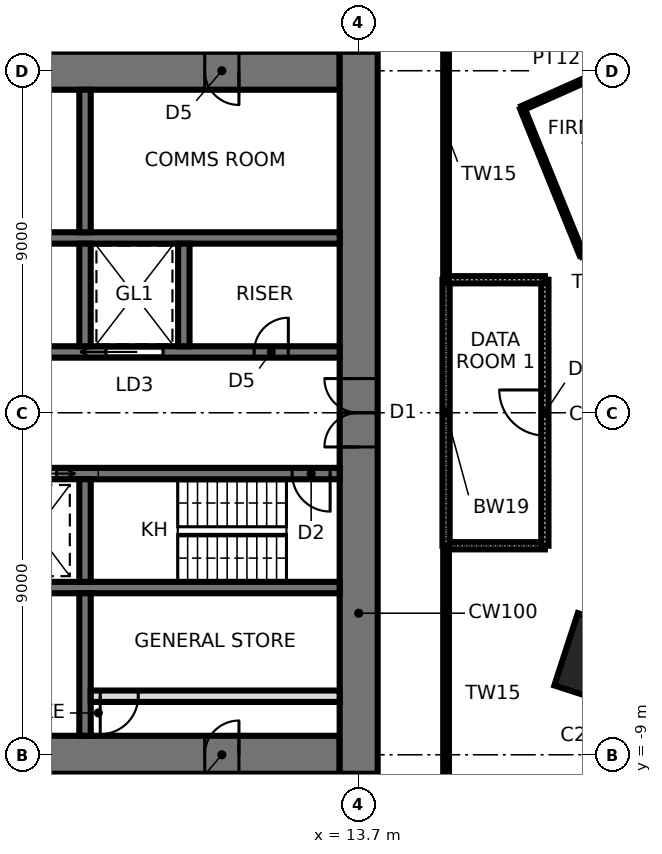
"""IFC4 building model, lengths in metres.
Left out: names, types, materials, properties, quantities, classifications, styles, units other than length and angle.
Written with IfcOpenShell. Run it as: python <this file> out.ifc"""

import sys

from ifc_helpers import new_model, si_unit, direction, frame, frame_2d, origin, origin_2d, place, context, subcontext, project, spatial, rectangle, extrude, element, fill, save


model = new_model("IFC4")
c1 = context("Model", 3, precision=1e-05, world=origin(), true_north=direction((0.0, 1.0)))
c2 = subcontext(c1, "Body", "Model", "MODEL_VIEW")
j1 = project(units=[si_unit("LENGTHUNIT", "METRE"), si_unit("PLANEANGLEUNIT", "RADIAN")], contexts=[c1])
p1 = place(None, origin())
s1 = spatial("IfcSite", under=j1, at=p1, CompositionType="ELEMENT")
p2 = place(p1, origin())
s2 = spatial("IfcBuilding", under=s1, at=p2, CompositionType="ELEMENT")
p3 = place(p2, frame((0.0, 0.0, 65.8)))
s3 = spatial("IfcBuildingStorey", under=s2, at=p3, CompositionType="ELEMENT", Elevation=65.8)
for number, where, z_axis, x_axis in (
    (1, (20.808, 6.761, 0.0), (0.0, 0.0, 1.0), (0.951, 0.309, 0.0)),
    (2, (20.109, -6.534, 0.0), (0.0, 0.0, 1.0), (0.951, -0.309, 0.0)),
):
    element("IfcColumn", number, at=place(p3, frame(where, z_axis=z_axis, x_axis=x_axis)), inside=s3, PredefinedType="COLUMN", context=c2, shape_type="SweptSolid", body=[
        extrude(rectangle(XDim=2.0, YDim=2.0, at=origin_2d()), origin(), (0.0, 0.0, 1.0), 4.2),
    ])
p4 = place(p3, frame((-13.2, -9.0, 0.0), z_axis=(0.0, 0.0, 1.0), x_axis=(1.0, 0.0, 0.0)))
e3 = element("IfcWall", 3, at=p4, inside=s3, PredefinedType="SHEAR", context=c2, shape_type="SweptSolid", body=[
    extrude(rectangle(XDim=26.4, YDim=1.0, at=frame_2d((13.2, 0.0))), origin(), (0.0, 0.0, 1.0), 4.2),
])
p5 = place(p4, frame((2.65, 0.0, 0.0)))
e4 = element("IfcOpeningElement", 4, at=p5, cuts=e3, PredefinedType="OPENING", context=c2, shape_type="SweptSolid", body=[
    extrude(rectangle(XDim=0.9, YDim=2.1, at=frame_2d((0.45, 1.05))), frame((0.0, 0.51, 0.0), z_axis=(0.0, -1.0, 0.0), x_axis=(1.0, 0.0, 0.0)), (0.0, 0.0, 1.0), 1.02),
])
p6 = place(p4, frame((9.5, 0.0, 0.0)))
e5 = element("IfcOpeningElement", 5, at=p6, cuts=e3, PredefinedType="OPENING", context=c2, shape_type="SweptSolid", body=[
    extrude(rectangle(XDim=0.9, YDim=2.1, at=frame_2d((0.45, 1.05))), frame((0.0, 0.51, 0.0), z_axis=(0.0, -1.0, 0.0), x_axis=(1.0, 0.0, 0.0)), (0.0, 0.0, 1.0), 1.02),
])
p7 = place(p4, frame((16.0, 0.0, 0.0)))
e6 = element("IfcOpeningElement", 6, at=p7, cuts=e3, PredefinedType="OPENING", context=c2, shape_type="SweptSolid", body=[
    extrude(rectangle(XDim=0.9, YDim=2.1, at=frame_2d((0.45, 1.05))), frame((0.0, 0.51, 0.0), z_axis=(0.0, -1.0, 0.0), x_axis=(1.0, 0.0, 0.0)), (0.0, 0.0, 1.0), 1.02),
])
p8 = place(p4, frame((22.85, 0.0, 0.0)))
e7 = element("IfcOpeningElement", 7, at=p8, cuts=e3, PredefinedType="OPENING", context=c2, shape_type="SweptSolid", body=[
    extrude(rectangle(XDim=0.9, YDim=2.1, at=frame_2d((0.45, 1.05))), frame((0.0, 0.51, 0.0), z_axis=(0.0, -1.0, 0.0), x_axis=(1.0, 0.0, 0.0)), (0.0, 0.0, 1.0), 1.02),
])
p9 = place(p3, frame((13.2, 9.0, 0.0), z_axis=(0.0, 0.0, 1.0), x_axis=(-1.0, 0.0, 0.0)))
e8 = element("IfcWall", 8, at=p9, inside=s3, PredefinedType="SHEAR", context=c2, shape_type="SweptSolid", body=[
    extrude(rectangle(XDim=26.4, YDim=1.0, at=frame_2d((13.2, 0.0))), origin(), (0.0, 0.0, 1.0), 4.2),
])
p10 = place(p9, frame((2.65, 0.0, 0.0)))
e9 = element("IfcOpeningElement", 9, at=p10, cuts=e8, PredefinedType="OPENING", context=c2, shape_type="SweptSolid", body=[
    extrude(rectangle(XDim=0.9, YDim=2.1, at=frame_2d((0.45, 1.05))), frame((0.0, 0.51, 0.0), z_axis=(0.0, -1.0, 0.0), x_axis=(1.0, 0.0, 0.0)), (0.0, 0.0, 1.0), 1.02),
])
p11 = place(p9, frame((9.5, 0.0, 0.0)))
e10 = element("IfcOpeningElement", 10, at=p11, cuts=e8, PredefinedType="OPENING", context=c2, shape_type="SweptSolid", body=[
    extrude(rectangle(XDim=0.9, YDim=2.1, at=frame_2d((0.45, 1.05))), frame((0.0, 0.51, 0.0), z_axis=(0.0, -1.0, 0.0), x_axis=(1.0, 0.0, 0.0)), (0.0, 0.0, 1.0), 1.02),
])
p12 = place(p9, frame((16.0, 0.0, 0.0)))
e11 = element("IfcOpeningElement", 11, at=p12, cuts=e8, PredefinedType="OPENING", context=c2, shape_type="SweptSolid", body=[
    extrude(rectangle(XDim=0.9, YDim=2.1, at=frame_2d((0.45, 1.05))), frame((0.0, 0.51, 0.0), z_axis=(0.0, -1.0, 0.0), x_axis=(1.0, 0.0, 0.0)), (0.0, 0.0, 1.0), 1.02),
])
p13 = place(p9, frame((21.25, 0.0, 0.0)))
e12 = element("IfcOpeningElement", 12, at=p13, cuts=e8, PredefinedType="OPENING", context=c2, shape_type="SweptSolid", body=[
    extrude(rectangle(XDim=0.9, YDim=2.1, at=frame_2d((0.45, 1.05))), frame((0.0, 0.51, 0.0), z_axis=(0.0, -1.0, 0.0), x_axis=(1.0, 0.0, 0.0)), (0.0, 0.0, 1.0), 1.02),
])
p14 = place(p9, frame((24.8, 0.0, 0.0)))
e13 = element("IfcOpeningElement", 13, at=p14, cuts=e8, PredefinedType="OPENING", context=c2, shape_type="SweptSolid", body=[
    extrude(rectangle(XDim=1.0, YDim=2.1, at=frame_2d((0.5, 1.05))), frame((0.0, 0.51, 0.0), z_axis=(0.0, -1.0, 0.0), x_axis=(1.0, 0.0, 0.0)), (0.0, 0.0, 1.0), 1.02),
])
p15 = place(p3, frame((13.7, -9.5, 0.0), z_axis=(0.0, 0.0, 1.0), x_axis=(0.0, 1.0, 0.0)))
e14 = element("IfcWall", 14, at=p15, inside=s3, PredefinedType="SHEAR", context=c2, shape_type="SweptSolid", body=[
    extrude(rectangle(XDim=19.0, YDim=1.0, at=frame_2d((9.5, 0.0))), origin(), (0.0, 0.0, 1.0), 4.2),
])
p16 = place(p15, frame((8.6, 0.0, 0.0)))
e15 = element("IfcOpeningElement", 15, at=p16, cuts=e14, PredefinedType="OPENING", context=c2, shape_type="SweptSolid", body=[
    extrude(rectangle(XDim=1.8, YDim=2.4, at=frame_2d((0.9, 1.2))), frame((0.0, 0.51, 0.0), z_axis=(0.0, -1.0, 0.0), x_axis=(1.0, 0.0, 0.0)), (0.0, 0.0, 1.0), 1.02),
])
p17 = place(p3, frame((-13.2, 1.6, 0.0), z_axis=(0.0, 0.0, 1.0), x_axis=(1.0, 0.0, 0.0)))
e16 = element("IfcWall", 16, at=p17, inside=s3, PredefinedType="SHEAR", context=c2, shape_type="SweptSolid", body=[
    extrude(rectangle(XDim=26.4, YDim=0.3, at=frame_2d((13.2, 0.0))), origin(), (0.0, 0.0, 1.0), 4.2),
])
p18 = place(p17, frame((0.25, 0.0, 0.0)))
e17 = element("IfcOpeningElement", 17, at=p18, cuts=e16, PredefinedType="OPENING", context=c2, shape_type="SweptSolid", body=[
    extrude(rectangle(XDim=1.0, YDim=2.1, at=frame_2d((0.5, 1.05))), frame((0.0, 0.16, 0.0), z_axis=(0.0, -1.0, 0.0), x_axis=(1.0, 0.0, 0.0)), (0.0, 0.0, 1.0), 0.32),
])
p19 = place(p17, frame((20.25, 0.0, 0.0)))
e18 = element("IfcOpeningElement", 18, at=p19, cuts=e16, PredefinedType="OPENING", context=c2, shape_type="SweptSolid", body=[
    extrude(rectangle(XDim=1.5, YDim=2.4, at=frame_2d((0.75, 1.2))), frame((0.0, 0.16, 0.0), z_axis=(0.0, -1.0, 0.0), x_axis=(1.0, 0.0, 0.0)), (0.0, 0.0, 1.0), 0.32),
])
p20 = place(p17, frame((7.45, 0.0, 0.0)))
e19 = element("IfcOpeningElement", 19, at=p20, cuts=e16, PredefinedType="OPENING", context=c2, shape_type="SweptSolid", body=[
    extrude(rectangle(XDim=1.1, YDim=2.3, at=frame_2d((0.55, 1.15))), frame((0.0, 0.16, 0.0), z_axis=(0.0, -1.0, 0.0), x_axis=(1.0, 0.0, 0.0)), (0.0, 0.0, 1.0), 0.32),
])
p21 = place(p17, frame((10.05, 0.0, 0.0)))
e20 = element("IfcOpeningElement", 20, at=p21, cuts=e16, PredefinedType="OPENING", context=c2, shape_type="SweptSolid", body=[
    extrude(rectangle(XDim=1.1, YDim=2.3, at=frame_2d((0.55, 1.15))), frame((0.0, 0.16, 0.0), z_axis=(0.0, -1.0, 0.0), x_axis=(1.0, 0.0, 0.0)), (0.0, 0.0, 1.0), 0.32),
])
p22 = place(p17, frame((12.65, 0.0, 0.0)))
e21 = element("IfcOpeningElement", 21, at=p22, cuts=e16, PredefinedType="OPENING", context=c2, shape_type="SweptSolid", body=[
    extrude(rectangle(XDim=1.1, YDim=2.3, at=frame_2d((0.55, 1.15))), frame((0.0, 0.16, 0.0), z_axis=(0.0, -1.0, 0.0), x_axis=(1.0, 0.0, 0.0)), (0.0, 0.0, 1.0), 0.32),
])
p23 = place(p17, frame((24.15, 0.0, 0.0)))
e22 = element("IfcOpeningElement", 22, at=p23, cuts=e16, PredefinedType="OPENING", context=c2, shape_type="SweptSolid", body=[
    extrude(rectangle(XDim=0.9, YDim=2.1, at=frame_2d((0.45, 1.05))), frame((0.0, 0.16, 0.0), z_axis=(0.0, -1.0, 0.0), x_axis=(1.0, 0.0, 0.0)), (0.0, 0.0, 1.0), 0.32),
])
p24 = place(p3, frame((-13.2, -1.6, 0.0), z_axis=(0.0, 0.0, 1.0), x_axis=(1.0, 0.0, 0.0)))
e23 = element("IfcWall", 23, at=p24, inside=s3, PredefinedType="SHEAR", context=c2, shape_type="SweptSolid", body=[
    extrude(rectangle(XDim=26.4, YDim=0.3, at=frame_2d((13.2, 0.0))), origin(), (0.0, 0.0, 1.0), 4.2),
])
p25 = place(p24, frame((25.15, 0.0, 0.0)))
e24 = element("IfcOpeningElement", 24, at=p25, cuts=e23, PredefinedType="OPENING", context=c2, shape_type="SweptSolid", body=[
    extrude(rectangle(XDim=1.0, YDim=2.1, at=frame_2d((0.5, 1.05))), frame((0.0, 0.16, 0.0), z_axis=(0.0, -1.0, 0.0), x_axis=(1.0, 0.0, 0.0)), (0.0, 0.0, 1.0), 0.32),
])
p26 = place(p24, frame((15.25, 0.0, 0.0)))
e25 = element("IfcOpeningElement", 25, at=p26, cuts=e23, PredefinedType="OPENING", context=c2, shape_type="SweptSolid", body=[
    extrude(rectangle(XDim=1.1, YDim=2.3, at=frame_2d((0.55, 1.15))), frame((0.0, 0.16, 0.0), z_axis=(0.0, -1.0, 0.0), x_axis=(1.0, 0.0, 0.0)), (0.0, 0.0, 1.0), 0.32),
])
p27 = place(p24, frame((17.85, 0.0, 0.0)))
e26 = element("IfcOpeningElement", 26, at=p27, cuts=e23, PredefinedType="OPENING", context=c2, shape_type="SweptSolid", body=[
    extrude(rectangle(XDim=1.1, YDim=2.3, at=frame_2d((0.55, 1.15))), frame((0.0, 0.16, 0.0), z_axis=(0.0, -1.0, 0.0), x_axis=(1.0, 0.0, 0.0)), (0.0, 0.0, 1.0), 0.32),
])
p28 = place(p24, frame((5.55, 0.0, 0.0)))
e27 = element("IfcOpeningElement", 27, at=p28, cuts=e23, PredefinedType="OPENING", context=c2, shape_type="SweptSolid", body=[
    extrude(rectangle(XDim=0.9, YDim=2.1, at=frame_2d((0.45, 1.05))), frame((0.0, 0.16, 0.0), z_axis=(0.0, -1.0, 0.0), x_axis=(1.0, 0.0, 0.0)), (0.0, 0.0, 1.0), 0.32),
])
for number, where, z_axis, x_axis in (
    (28, (-13.2, 4.6, 0.0), (0.0, 0.0, 1.0), (1.0, 0.0, 0.0)),
    (29, (-13.2, -4.6, 0.0), (0.0, 0.0, 1.0), (1.0, 0.0, 0.0)),
):
    element("IfcWall", number, at=place(p3, frame(where, z_axis=z_axis, x_axis=x_axis)), inside=s3, PredefinedType="SHEAR", context=c2, shape_type="SweptSolid", body=[
        extrude(rectangle(XDim=26.4, YDim=0.3, at=frame_2d((13.2, 0.0))), origin(), (0.0, 0.0, 1.0), 4.2),
    ])
p29 = place(p3, frame((6.5, 1.75, 0.0), z_axis=(0.0, 0.0, 1.0), x_axis=(0.0, 1.0, 0.0)))
e30 = element("IfcWall", 30, at=p29, inside=s3, PredefinedType="SHEAR", context=c2, shape_type="SweptSolid", body=[
    extrude(rectangle(XDim=2.7, YDim=0.3, at=frame_2d((1.35, 0.0))), origin(), (0.0, 0.0, 1.0), 4.2),
])
p30 = place(p3, frame((6.5, 4.75, 0.0), z_axis=(0.0, 0.0, 1.0), x_axis=(0.0, 1.0, 0.0)))
e31 = element("IfcWall", 31, at=p30, inside=s3, PredefinedType="SHEAR", context=c2, shape_type="SweptSolid", body=[
    extrude(rectangle(XDim=3.75, YDim=0.3, at=frame_2d((1.875, 0.0))), origin(), (0.0, 0.0, 1.0), 4.2),
])
p31 = place(p3, frame((6.5, -1.75, 0.0), z_axis=(0.0, 0.0, 1.0), x_axis=(0.0, -1.0, 0.0)))
e32 = element("IfcWall", 32, at=p31, inside=s3, PredefinedType="SHEAR", context=c2, shape_type="SweptSolid", body=[
    extrude(rectangle(XDim=2.7, YDim=0.3, at=frame_2d((1.35, 0.0))), origin(), (0.0, 0.0, 1.0), 4.2),
])
p32 = place(p3, frame((6.5, -4.75, 0.0), z_axis=(0.0, 0.0, 1.0), x_axis=(0.0, -1.0, 0.0)))
e33 = element("IfcWall", 33, at=p32, inside=s3, PredefinedType="SHEAR", context=c2, shape_type="SweptSolid", body=[
    extrude(rectangle(XDim=3.75, YDim=0.3, at=frame_2d((1.875, 0.0))), origin(), (0.0, 0.0, 1.0), 4.2),
])
p33 = place(p3, frame((9.1, 1.75, 0.0), z_axis=(0.0, 0.0, 1.0), x_axis=(0.0, 1.0, 0.0)))
e34 = element("IfcWall", 34, at=p33, inside=s3, PredefinedType="SHEAR", context=c2, shape_type="SweptSolid", body=[
    extrude(rectangle(XDim=2.7, YDim=0.3, at=frame_2d((1.35, 0.0))), origin(), (0.0, 0.0, 1.0), 4.2),
])
p34 = place(p3, frame((6.65, -7.46, 0.0), z_axis=(0.0, 0.0, 1.0), x_axis=(1.0, 0.0, 0.0)))
e35 = element("IfcWall", 35, at=p34, inside=s3, PredefinedType="PARTITIONING", context=c2, shape_type="SweptSolid", body=[
    extrude(rectangle(XDim=6.55, YDim=0.3, at=frame_2d((3.275, 0.0))), origin(), (0.0, 0.0, 1.0), 4.04),
])
p35 = place(p34, frame((0.25, 0.0, 0.0)))
e36 = element("IfcOpeningElement", 36, at=p35, cuts=e35, PredefinedType="OPENING", context=c2, shape_type="SweptSolid", body=[
    extrude(rectangle(XDim=1.0, YDim=2.4, at=frame_2d((0.5, 1.2))), frame((0.0, 0.16, 0.0), z_axis=(0.0, -1.0, 0.0), x_axis=(1.0, 0.0, 0.0)), (0.0, 0.0, 1.0), 0.32),
])
p36 = place(p3, frame((16.0, -11.3, 0.0), z_axis=(0.0, 0.0, 1.0), x_axis=(0.0, 1.0, 0.0)))
e37 = element("IfcWall", 37, at=p36, inside=s3, PredefinedType="PARTITIONING", context=c2, shape_type="SweptSolid", body=[
    extrude(rectangle(XDim=7.8, YDim=0.15, at=frame_2d((3.9, 0.0))), origin(), (0.0, 0.0, 1.0), 4.04),
])
p37 = place(p3, frame((16.0, -3.5, 0.0), z_axis=(0.0, 0.0, 1.0), x_axis=(1.0, 0.0, 0.0)))
e38 = element("IfcWall", 38, at=p37, inside=s3, PredefinedType="SOLIDWALL", context=c2, shape_type="SweptSolid", body=[
    extrude(rectangle(XDim=2.6, YDim=0.19, at=frame_2d((1.3, 0.0))), origin(), (0.0, 0.0, 1.0), 4.04),
])
p38 = place(p3, frame((16.0, 3.5, 0.0), z_axis=(0.0, 0.0, 1.0), x_axis=(0.0, -1.0, 0.0)))
e39 = element("IfcWall", 39, at=p38, inside=s3, PredefinedType="SOLIDWALL", context=c2, shape_type="SweptSolid", body=[
    extrude(rectangle(XDim=7.0, YDim=0.19, at=frame_2d((3.5, 0.0))), origin(), (0.0, 0.0, 1.0), 4.04),
])
p39 = place(p3, frame((18.6, -3.5, 0.0), z_axis=(0.0, 0.0, 1.0), x_axis=(0.0, 1.0, 0.0)))
e40 = element("IfcWall", 40, at=p39, inside=s3, PredefinedType="SOLIDWALL", context=c2, shape_type="SweptSolid", body=[
    extrude(rectangle(XDim=7.0, YDim=0.19, at=frame_2d((3.5, 0.0))), origin(), (0.0, 0.0, 1.0), 3.586),
])
p40 = place(p39, frame((2.9, 0.0, 0.0)))
e41 = element("IfcOpeningElement", 41, at=p40, cuts=e40, PredefinedType="OPENING", context=c2, shape_type="SweptSolid", body=[
    extrude(rectangle(XDim=1.2, YDim=2.1, at=frame_2d((0.6, 1.05))), frame((0.0, 0.105, 0.0), z_axis=(0.0, -1.0, 0.0), x_axis=(1.0, 0.0, 0.0)), (0.0, 0.0, 1.0), 0.21),
])
p41 = place(p3, frame((18.6, 3.5, 0.0), z_axis=(0.0, 0.0, 1.0), x_axis=(-1.0, 0.0, 0.0)))
e42 = element("IfcWall", 42, at=p41, inside=s3, PredefinedType="SOLIDWALL", context=c2, shape_type="SweptSolid", body=[
    extrude(rectangle(XDim=2.6, YDim=0.19, at=frame_2d((1.3, 0.0))), origin(), (0.0, 0.0, 1.0), 4.04),
])
p42 = place(p3, frame((19.57, 4.16, 0.0), z_axis=(0.0, 0.0, 1.0), x_axis=(0.978146625084, 0.207916280835, 0.0)))
e43 = element("IfcWall", 43, at=p42, inside=s3, PredefinedType="PARTITIONING", context=c2, shape_type="SweptSolid", body=[
    extrude(rectangle(XDim=6.7, YDim=0.12, at=frame_2d((3.35, 0.0))), origin(), (0.0, 0.0, 1.0), 4.04),
])
p43 = place(p3, frame((18.003, 8.015, 0.0), z_axis=(0.0, 0.0, 1.0), x_axis=(0.376482466065, -0.926423743622, 0.0)))
e44 = element("IfcWall", 44, at=p43, inside=s3, PredefinedType="PARTITIONING", context=c2, shape_type="SweptSolid", body=[
    extrude(rectangle(XDim=4.162, YDim=0.12, at=frame_2d((2.081, 0.0))), origin(), (0.0, 0.0, 1.0), 4.04),
])
p44 = place(p3, frame((24.124, 10.74, 0.0), z_axis=(0.0, 0.0, 1.0), x_axis=(-0.91354990356, -0.406726657235, 0.0)))
e45 = element("IfcWall", 45, at=p44, inside=s3, PredefinedType="PARTITIONING", context=c2, shape_type="SweptSolid", body=[
    extrude(rectangle(XDim=6.7, YDim=0.12, at=frame_2d((3.35, 0.0))), origin(), (0.0, 0.0, 1.0), 4.04),
])
p45 = place(p44, frame((2.85, 0.0, 0.0)))
e46 = element("IfcOpeningElement", 46, at=p45, cuts=e45, PredefinedType="OPENING", context=c2, shape_type="SweptSolid", body=[
    extrude(rectangle(XDim=1.0, YDim=2.4, at=frame_2d((0.5, 1.2))), frame((0.0, 0.07, 0.0), z_axis=(0.0, -1.0, 0.0), x_axis=(1.0, 0.0, 0.0)), (0.0, 0.0, 1.0), 0.14),
])
p46 = place(p3, frame((16.0, 3.5, 0.0), z_axis=(0.0, 0.0, 1.0), x_axis=(0.0, 1.0, 0.0)))
e47 = element("IfcWall", 47, at=p46, inside=s3, PredefinedType="PARTITIONING", context=c2, shape_type="SweptSolid", body=[
    extrude(rectangle(XDim=7.8, YDim=0.15, at=frame_2d((3.9, 0.0))), origin(), (0.0, 0.0, 1.0), 4.04),
])
p47 = place(p16, origin())
e48 = element("IfcDoor", 48, at=p47, inside=s3, OperationType="DOUBLE_DOOR_SINGLE_SWING", PredefinedType="DOOR", context=c2, shape_type="SweptSolid", body=[
    extrude(rectangle(XDim=1.72, YDim=2.36, at=frame_2d((0.9, 1.18))), frame((0.0, 0.025, 0.0), z_axis=(0.0, -1.0, 0.0), x_axis=(1.0, 0.0, 0.0)), (0.0, 0.0, 1.0), 0.05),
    extrude(rectangle(XDim=0.04, YDim=2.4, at=frame_2d((0.02, 1.2))), frame((0.0, 0.25, 0.0), z_axis=(0.0, -1.0, 0.0), x_axis=(1.0, 0.0, 0.0)), (0.0, 0.0, 1.0), 0.5),
    extrude(rectangle(XDim=0.04, YDim=2.4, at=frame_2d((1.78, 1.2))), frame((0.0, 0.25, 0.0), z_axis=(0.0, -1.0, 0.0), x_axis=(1.0, 0.0, 0.0)), (0.0, 0.0, 1.0), 0.5),
    extrude(rectangle(XDim=1.72, YDim=0.04, at=frame_2d((0.9, 2.38))), frame((0.0, 0.25, 0.0), z_axis=(0.0, -1.0, 0.0), x_axis=(1.0, 0.0, 0.0)), (0.0, 0.0, 1.0), 0.5),
])
fill(e15, e48)
p48 = place(p25, frame((1.0, 0.0, 0.0), z_axis=(0.0, 0.0, 1.0), x_axis=(-1.0, 0.0, 0.0)))
e49 = element("IfcDoor", 49, at=p48, inside=s3, OperationType="SINGLE_SWING_LEFT", PredefinedType="DOOR", context=c2, shape_type="SweptSolid", body=[
    extrude(rectangle(XDim=1.0, YDim=2.1, at=frame_2d((0.5, 1.05))), frame((0.0, 0.025, 0.0), z_axis=(0.0, -1.0, 0.0), x_axis=(1.0, 0.0, 0.0)), (0.0, 0.0, 1.0), 0.05),
])
fill(e24, e49)
p49 = place(p19, origin())
e50 = element("IfcDoor", 50, at=p49, inside=s3, OperationType="SLIDING_TO_LEFT", PredefinedType="DOOR", context=c2, shape_type="SweptSolid", body=[
    extrude(rectangle(XDim=1.5, YDim=2.4, at=frame_2d((0.75, 1.2))), frame((0.0, 0.025, 0.0), z_axis=(0.0, -1.0, 0.0), x_axis=(1.0, 0.0, 0.0)), (0.0, 0.0, 1.0), 0.05),
])
fill(e18, e50)
p50 = place(p27, frame((1.1, 0.0, 0.0), z_axis=(0.0, 0.0, 1.0), x_axis=(-1.0, 0.0, 0.0)))
e51 = element("IfcDoor", 51, at=p50, inside=s3, OperationType="SLIDING_TO_LEFT", PredefinedType="DOOR", context=c2, shape_type="SweptSolid", body=[
    extrude(rectangle(XDim=1.1, YDim=2.3, at=frame_2d((0.55, 1.15))), frame((0.0, 0.025, 0.0), z_axis=(0.0, -1.0, 0.0), x_axis=(1.0, 0.0, 0.0)), (0.0, 0.0, 1.0), 0.05),
])
fill(e26, e51)
p51 = place(p23, origin())
e52 = element("IfcDoor", 52, at=p51, inside=s3, OperationType="SINGLE_SWING_RIGHT", PredefinedType="DOOR", context=c2, shape_type="SweptSolid", body=[
    extrude(rectangle(XDim=0.9, YDim=2.1, at=frame_2d((0.45, 1.05))), frame((0.0, 0.025, 0.0), z_axis=(0.0, -1.0, 0.0), x_axis=(1.0, 0.0, 0.0)), (0.0, 0.0, 1.0), 0.05),
])
fill(e22, e52)
p52 = place(p10, origin())
e53 = element("IfcDoor", 53, at=p52, inside=s3, OperationType="SINGLE_SWING_LEFT", PredefinedType="DOOR", context=c2, shape_type="SweptSolid", body=[
    extrude(rectangle(XDim=0.82, YDim=2.06, at=frame_2d((0.45, 1.03))), frame((0.0, 0.025, 0.0), z_axis=(0.0, -1.0, 0.0), x_axis=(1.0, 0.0, 0.0)), (0.0, 0.0, 1.0), 0.05),
    extrude(rectangle(XDim=0.04, YDim=2.1, at=frame_2d((0.02, 1.05))), frame((0.0, 0.25, 0.0), z_axis=(0.0, -1.0, 0.0), x_axis=(1.0, 0.0, 0.0)), (0.0, 0.0, 1.0), 0.5),
    extrude(rectangle(XDim=0.04, YDim=2.1, at=frame_2d((0.88, 1.05))), frame((0.0, 0.25, 0.0), z_axis=(0.0, -1.0, 0.0), x_axis=(1.0, 0.0, 0.0)), (0.0, 0.0, 1.0), 0.5),
    extrude(rectangle(XDim=0.82, YDim=0.04, at=frame_2d((0.45, 2.08))), frame((0.0, 0.25, 0.0), z_axis=(0.0, -1.0, 0.0), x_axis=(1.0, 0.0, 0.0)), (0.0, 0.0, 1.0), 0.5),
])
fill(e9, e53)
p53 = place(p8, origin())
e54 = element("IfcDoor", 54, at=p53, inside=s3, OperationType="SINGLE_SWING_RIGHT", PredefinedType="DOOR", context=c2, shape_type="SweptSolid", body=[
    extrude(rectangle(XDim=0.82, YDim=2.06, at=frame_2d((0.45, 1.03))), frame((0.0, 0.025, 0.0), z_axis=(0.0, -1.0, 0.0), x_axis=(1.0, 0.0, 0.0)), (0.0, 0.0, 1.0), 0.05),
    extrude(rectangle(XDim=0.04, YDim=2.1, at=frame_2d((0.02, 1.05))), frame((0.0, 0.25, 0.0), z_axis=(0.0, -1.0, 0.0), x_axis=(1.0, 0.0, 0.0)), (0.0, 0.0, 1.0), 0.5),
    extrude(rectangle(XDim=0.04, YDim=2.1, at=frame_2d((0.88, 1.05))), frame((0.0, 0.25, 0.0), z_axis=(0.0, -1.0, 0.0), x_axis=(1.0, 0.0, 0.0)), (0.0, 0.0, 1.0), 0.5),
    extrude(rectangle(XDim=0.82, YDim=0.04, at=frame_2d((0.45, 2.08))), frame((0.0, 0.25, 0.0), z_axis=(0.0, -1.0, 0.0), x_axis=(1.0, 0.0, 0.0)), (0.0, 0.0, 1.0), 0.5),
])
fill(e7, e54)
p54 = place(p35, frame((1.0, 0.0, 0.0), z_axis=(0.0, 0.0, 1.0), x_axis=(-1.0, 0.0, 0.0)))
e55 = element("IfcDoor", 55, at=p54, inside=s3, OperationType="SINGLE_SWING_RIGHT", PredefinedType="DOOR", context=c2, shape_type="SweptSolid", body=[
    extrude(rectangle(XDim=1.0, YDim=2.4, at=frame_2d((0.5, 1.2))), frame((0.0, 0.025, 0.0), z_axis=(0.0, -1.0, 0.0), x_axis=(1.0, 0.0, 0.0)), (0.0, 0.0, 1.0), 0.05),
])
fill(e36, e55)
p55 = place(p40, origin())
e56 = element("IfcDoor", 56, at=p55, inside=s3, OperationType="SINGLE_SWING_RIGHT", PredefinedType="DOOR", context=c2, shape_type="SweptSolid", body=[
    extrude(rectangle(XDim=1.2, YDim=2.1, at=frame_2d((0.6, 1.05))), frame((0.0, 0.025, 0.0), z_axis=(0.0, -1.0, 0.0), x_axis=(1.0, 0.0, 0.0)), (0.0, 0.0, 1.0), 0.05),
])
fill(e41, e56)
save(model, sys.argv[1])
